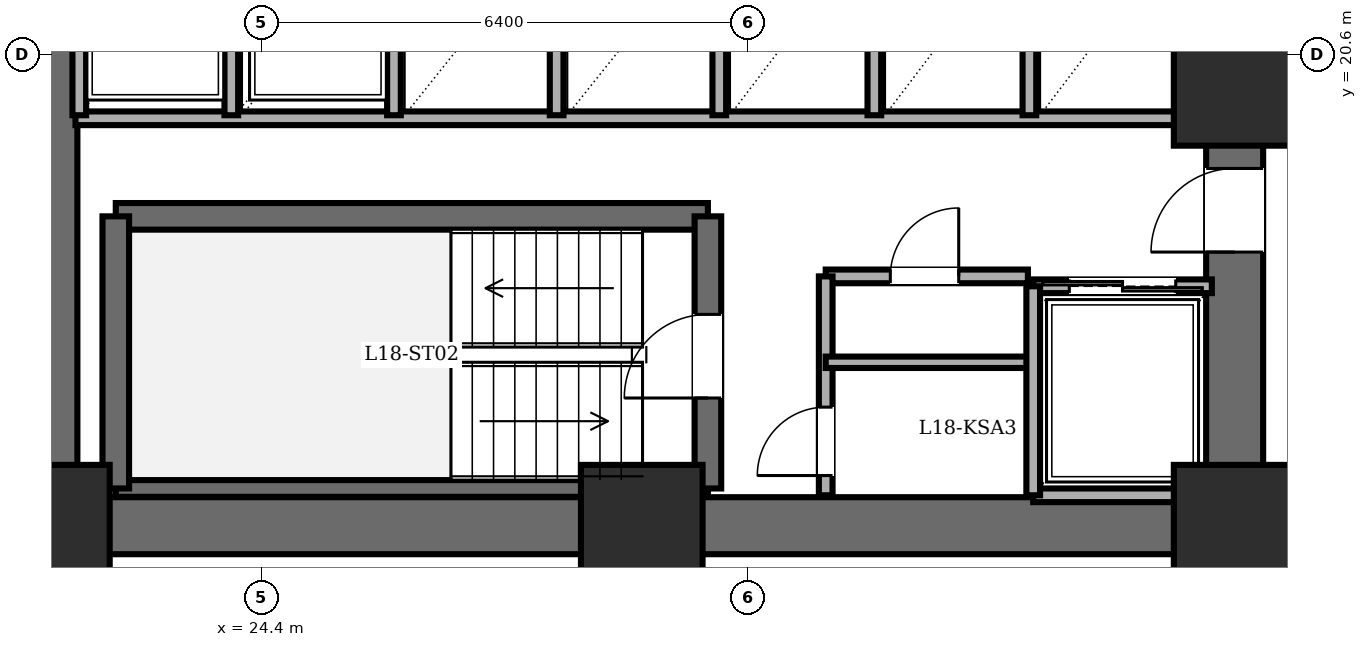
"""IFC4 building model, lengths in metres.
Left out: names, types, materials, properties, quantities, classifications, styles, units other than length and angle.
Written with IfcOpenShell. Run it as: python <this file> out.ifc"""

import sys

from ifc_helpers import new_model, si_unit, direction, frame, frame_2d, origin, origin_2d, place, context, subcontext, project, spatial, rectangle, extrude, element, fill, save


model = new_model("IFC4")
c1 = context("Model", 3, precision=1e-05, world=origin(), true_north=direction((0.0, 1.0)))
c2 = subcontext(c1, "Body", "Model", "MODEL_VIEW")
j1 = project(units=[si_unit("LENGTHUNIT", "METRE"), si_unit("PLANEANGLEUNIT", "RADIAN")], contexts=[c1])
p1 = place(None, origin())
s1 = spatial("IfcSite", under=j1, at=p1, CompositionType="ELEMENT")
p2 = place(p1, origin())
s2 = spatial("IfcBuilding", under=s1, at=p2, CompositionType="ELEMENT")
p3 = place(p2, frame((0.0, 0.0, 68.4)))
s3 = spatial("IfcBuildingStorey", under=s2, at=p3, CompositionType="ELEMENT", Elevation=68.4)
for number, where, z_axis, x_axis in (
    (1, (21.6, 14.4, 0.0), (0.0, 0.0, 1.0), (1.0, 0.0, 0.0)),
    (2, (29.4, 14.4, 0.0), (0.0, 0.0, 1.0), (1.0, 0.0, 0.0)),
    (3, (37.2, 14.4, 0.0), (0.0, 0.0, 1.0), (1.0, 0.0, 0.0)),
    (4, (37.2, 20.2, 0.0), (0.0, 0.0, 1.0), (1.0, 0.0, 0.0)),
):
    element("IfcColumn", number, at=place(p3, frame(where, z_axis=z_axis, x_axis=x_axis)), inside=s3, PredefinedType="COLUMN", context=c2, shape_type="SweptSolid", body=[
        extrude(rectangle(XDim=1.6, YDim=1.6, at=origin_2d()), origin(), (0.0, 0.0, 1.0), 3.6),
    ])
p4 = place(p3, frame((21.6, 14.4, 0.0), z_axis=(0.0, 0.0, 1.0), x_axis=(0.0, 1.0, 0.0)))
e5 = element("IfcWall", 5, at=p4, inside=s3, PredefinedType="SHEAR", context=c2, shape_type="SweptSolid", body=[
    extrude(rectangle(XDim=19.2, YDim=0.75, at=frame_2d((9.6, 0.0))), origin(), (0.0, 0.0, 1.0), 3.4),
])
p5 = place(p3, frame((37.2, 14.4, 0.0), z_axis=(0.0, 0.0, 1.0), x_axis=(-1.0, 0.0, 0.0)))
e6 = element("IfcWall", 6, at=p5, inside=s3, PredefinedType="SHEAR", context=c2, shape_type="SweptSolid", body=[
    extrude(rectangle(XDim=15.6, YDim=0.75, at=frame_2d((7.8, 0.0))), origin(), (0.0, 0.0, 1.0), 3.4),
])
p6 = place(p3, frame((37.2, 14.4, 0.0), z_axis=(0.0, 0.0, 1.0), x_axis=(0.0, 1.0, 0.0)))
e7 = element("IfcWall", 7, at=p6, inside=s3, PredefinedType="SHEAR", context=c2, shape_type="SweptSolid", body=[
    extrude(rectangle(XDim=19.2, YDim=0.75, at=frame_2d((9.6, 0.0))), origin(), (0.0, 0.0, 1.0), 3.4),
])
p7 = place(p6, frame((15.8, 0.0, 0.0)))
e8 = element("IfcOpeningElement", 8, at=p7, cuts=e7, PredefinedType="OPENING", context=c2, shape_type="SweptSolid", body=[
    extrude(rectangle(XDim=1.15, YDim=2.15, at=frame_2d((0.575, 1.075))), frame((0.0, 0.385, 0.0), z_axis=(0.0, -1.0, 0.0), x_axis=(1.0, 0.0, 0.0)), (0.0, 0.0, 1.0), 0.77),
])
p8 = place(p6, frame((3.6, 0.0, 0.0)))
e9 = element("IfcOpeningElement", 9, at=p8, cuts=e7, PredefinedType="OPENING", context=c2, shape_type="SweptSolid", body=[
    extrude(rectangle(XDim=1.1, YDim=2.15, at=frame_2d((0.55, 1.075))), frame((0.0, 0.385, 0.0), z_axis=(0.0, -1.0, 0.0), x_axis=(1.0, 0.0, 0.0)), (0.0, 0.0, 1.0), 0.77),
])
p9 = place(p6, frame((8.6, 0.0, 0.0)))
e10 = element("IfcOpeningElement", 10, at=p9, cuts=e7, PredefinedType="OPENING", context=c2, shape_type="SweptSolid", body=[
    extrude(rectangle(XDim=1.3, YDim=2.2, at=frame_2d((0.65, 1.1))), frame((0.0, 0.385, 0.0), z_axis=(0.0, -1.0, 0.0), x_axis=(1.0, 0.0, 0.0)), (0.0, 0.0, 1.0), 0.77),
])
p10 = place(p3, frame((22.48, 18.47, 0.0), z_axis=(0.0, 0.0, 1.0), x_axis=(1.0, 0.0, 0.0)))
e11 = element("IfcWall", 11, at=p10, inside=s3, PredefinedType="SOLIDWALL", context=c2, shape_type="SweptSolid", body=[
    extrude(rectangle(XDim=7.79, YDim=0.35, at=frame_2d((3.895, 0.0))), origin(), (0.0, 0.0, 1.0), 3.4),
])
p11 = place(p3, frame((22.48, 14.89, 0.0), z_axis=(0.0, 0.0, 1.0), x_axis=(1.0, 0.0, 0.0)))
e12 = element("IfcWall", 12, at=p11, inside=s3, PredefinedType="PARTITIONING", context=c2, shape_type="SweptSolid", body=[
    extrude(rectangle(XDim=7.79, YDim=0.22, at=frame_2d((3.895, 0.0))), origin(), (0.0, 0.0, 1.0), 3.4),
])
p12 = place(p3, frame((22.48, 14.89, 0.0), z_axis=(0.0, 0.0, 1.0), x_axis=(0.0, 1.0, 0.0)))
e13 = element("IfcWall", 13, at=p12, inside=s3, PredefinedType="SOLIDWALL", context=c2, shape_type="SweptSolid", body=[
    extrude(rectangle(XDim=3.58, YDim=0.35, at=frame_2d((1.79, 0.0))), origin(), (0.0, 0.0, 1.0), 3.4),
])
p13 = place(p3, frame((30.27, 14.89, 0.0), z_axis=(0.0, 0.0, 1.0), x_axis=(0.0, 1.0, 0.0)))
e14 = element("IfcWall", 14, at=p13, inside=s3, PredefinedType="SOLIDWALL", context=c2, shape_type="SweptSolid", body=[
    extrude(rectangle(XDim=3.58, YDim=0.35, at=frame_2d((1.79, 0.0))), origin(), (0.0, 0.0, 1.0), 3.4),
])
p14 = place(p13, frame((1.19, 0.0, 0.0)))
e15 = element("IfcOpeningElement", 15, at=p14, cuts=e14, PredefinedType="OPENING", context=c2, shape_type="SweptSolid", body=[
    extrude(rectangle(XDim=1.1, YDim=2.15, at=frame_2d((0.55, 1.075))), frame((0.0, 0.185, 0.0), z_axis=(0.0, -1.0, 0.0), x_axis=(1.0, 0.0, 0.0)), (0.0, 0.0, 1.0), 0.37),
])
p15 = place(p3, frame((21.95, 19.76, 0.0), z_axis=(0.0, 0.0, 1.0), x_axis=(1.0, 0.0, 0.0)))
e16 = element("IfcWall", 16, at=p15, inside=s3, PredefinedType="PARTITIONING", context=c2, shape_type="SweptSolid", body=[
    extrude(rectangle(XDim=14.87, YDim=0.18, at=frame_2d((7.435, 0.0))), origin(), (0.0, 0.0, 1.0), 3.4),
])
p16 = place(p3, frame((31.82, 17.68, 0.0), z_axis=(0.0, 0.0, 1.0), x_axis=(1.0, 0.0, 0.0)))
e17 = element("IfcWall", 17, at=p16, inside=s3, PredefinedType="PARTITIONING", context=c2, shape_type="SweptSolid", body=[
    extrude(rectangle(XDim=2.66, YDim=0.18, at=frame_2d((1.33, 0.0))), origin(), (0.0, 0.0, 1.0), 3.4),
])
p17 = place(p16, frame((0.85, 0.0, 0.0)))
e18 = element("IfcOpeningElement", 18, at=p17, cuts=e17, PredefinedType="OPENING", context=c2, shape_type="SweptSolid", body=[
    extrude(rectangle(XDim=0.9, YDim=2.05, at=frame_2d((0.45, 1.025))), frame((0.0, 0.1, 0.0), z_axis=(0.0, -1.0, 0.0), x_axis=(1.0, 0.0, 0.0)), (0.0, 0.0, 1.0), 0.2),
])
p18 = place(p3, frame((31.82, 14.8, 0.0), z_axis=(0.0, 0.0, 1.0), x_axis=(0.0, 1.0, 0.0)))
e19 = element("IfcWall", 19, at=p18, inside=s3, PredefinedType="PARTITIONING", context=c2, shape_type="SweptSolid", body=[
    extrude(rectangle(XDim=2.88, YDim=0.18, at=frame_2d((1.44, 0.0))), origin(), (0.0, 0.0, 1.0), 3.4),
])
p19 = place(p18, frame((0.26, 0.0, 0.0)))
e20 = element("IfcOpeningElement", 20, at=p19, cuts=e19, PredefinedType="OPENING", context=c2, shape_type="SweptSolid", body=[
    extrude(rectangle(XDim=0.9, YDim=2.05, at=frame_2d((0.45, 1.025))), frame((0.0, 0.1, 0.0), z_axis=(0.0, -1.0, 0.0), x_axis=(1.0, 0.0, 0.0)), (0.0, 0.0, 1.0), 0.2),
])
p20 = place(p3, frame((31.82, 16.55, 0.0), z_axis=(0.0, 0.0, 1.0), x_axis=(1.0, 0.0, 0.0)))
e21 = element("IfcWall", 21, at=p20, inside=s3, PredefinedType="PARTITIONING", context=c2, shape_type="SweptSolid", body=[
    extrude(rectangle(XDim=2.66, YDim=0.15, at=frame_2d((1.33, 0.0))), origin(), (0.0, 0.0, 1.0), 3.4),
])
p21 = place(p3, frame((34.55, 17.55, 0.0), z_axis=(0.0, 0.0, 1.0), x_axis=(1.0, 0.0, 0.0)))
e22 = element("IfcWall", 22, at=p21, inside=s3, PredefinedType="PARTITIONING", context=c2, shape_type="SweptSolid", body=[
    extrude(rectangle(XDim=2.35, YDim=0.18, at=frame_2d((1.175, 0.0))), origin(), (0.0, 0.0, 1.0), 3.4),
])
p22 = place(p21, frame((0.475, 0.0, 0.0)))
e23 = element("IfcOpeningElement", 23, at=p22, cuts=e22, PredefinedType="OPENING", context=c2, shape_type="SweptSolid", body=[
    extrude(rectangle(XDim=1.4, YDim=2.3, at=frame_2d((0.7, 1.15))), frame((0.0, 0.1, 0.0), z_axis=(0.0, -1.0, 0.0), x_axis=(1.0, 0.0, 0.0)), (0.0, 0.0, 1.0), 0.2),
])
p23 = place(p3, frame((36.9, 14.8, 0.0), z_axis=(0.0, 0.0, 1.0), x_axis=(-1.0, 0.0, 0.0)))
e24 = element("IfcWall", 24, at=p23, inside=s3, PredefinedType="PARTITIONING", context=c2, shape_type="SweptSolid", body=[
    extrude(rectangle(XDim=2.35, YDim=0.18, at=frame_2d((1.175, 0.0))), origin(), (0.0, 0.0, 1.0), 3.4),
])
p24 = place(p3, frame((34.55, 17.55, 0.0), z_axis=(0.0, 0.0, 1.0), x_axis=(0.0, -1.0, 0.0)))
e25 = element("IfcWall", 25, at=p24, inside=s3, PredefinedType="PARTITIONING", context=c2, shape_type="SweptSolid", body=[
    extrude(rectangle(XDim=2.75, YDim=0.18, at=frame_2d((1.375, 0.0))), origin(), (0.0, 0.0, 1.0), 3.4),
])
for number, where, z_axis, x_axis in (
    (26, (24.0, 19.8, 0.0), (0.0, 0.0, 1.0), (0.0, 1.0, 0.0)),
    (27, (22.0, 22.3, 0.0), (0.0, 0.0, 1.0), (0.0, -1.0, 0.0)),
    (28, (26.14, 19.8, 0.0), (0.0, 0.0, 1.0), (0.0, 1.0, 0.0)),
    (29, (28.28, 19.8, 0.0), (0.0, 0.0, 1.0), (0.0, 1.0, 0.0)),
    (30, (30.42, 19.8, 0.0), (0.0, 0.0, 1.0), (0.0, 1.0, 0.0)),
    (31, (32.46, 19.8, 0.0), (0.0, 0.0, 1.0), (0.0, 1.0, 0.0)),
    (32, (34.5, 19.8, 0.0), (0.0, 0.0, 1.0), (0.0, 1.0, 0.0)),
    (33, (36.54, 19.8, 0.0), (0.0, 0.0, 1.0), (0.0, 1.0, 0.0)),
):
    element("IfcWall", number, at=place(p3, frame(where, z_axis=z_axis, x_axis=x_axis)), inside=s3, PredefinedType="PARTITIONING", context=c2, shape_type="SweptSolid", body=[
        extrude(rectangle(XDim=2.5, YDim=0.18, at=frame_2d((1.25, 0.0))), origin(), (0.0, 0.0, 1.0), 3.4),
    ])
p25 = place(p14, origin())
e34 = element("IfcDoor", 34, at=p25, inside=s3, OperationType="SINGLE_SWING_LEFT", PredefinedType="DOOR", context=c2, shape_type="SweptSolid", body=[
    extrude(rectangle(XDim=1.1, YDim=2.15, at=frame_2d((0.55, 1.075))), frame((0.0, 0.025, 0.0), z_axis=(0.0, -1.0, 0.0), x_axis=(1.0, 0.0, 0.0)), (0.0, 0.0, 1.0), 0.05),
])
fill(e15, e34)
p26 = place(p8, origin())
e35 = element("IfcDoor", 35, at=p26, inside=s3, OperationType="SINGLE_SWING_LEFT", PredefinedType="DOOR", context=c2, shape_type="SweptSolid", body=[
    extrude(rectangle(XDim=1.1, YDim=2.15, at=frame_2d((0.55, 1.075))), frame((0.0, 0.025, 0.0), z_axis=(0.0, -1.0, 0.0), x_axis=(1.0, 0.0, 0.0)), (0.0, 0.0, 1.0), 0.05),
])
fill(e9, e35)
p27 = place(p17, origin())
e36 = element("IfcDoor", 36, at=p27, inside=s3, OperationType="SINGLE_SWING_RIGHT", PredefinedType="DOOR", context=c2, shape_type="SweptSolid", body=[
    extrude(rectangle(XDim=0.9, YDim=2.05, at=frame_2d((0.45, 1.025))), frame((0.0, 0.025, 0.0), z_axis=(0.0, -1.0, 0.0), x_axis=(1.0, 0.0, 0.0)), (0.0, 0.0, 1.0), 0.05),
])
fill(e18, e36)
p28 = place(p19, origin())
e37 = element("IfcDoor", 37, at=p28, inside=s3, OperationType="SINGLE_SWING_LEFT", PredefinedType="DOOR", context=c2, shape_type="SweptSolid", body=[
    extrude(rectangle(XDim=0.9, YDim=2.05, at=frame_2d((0.45, 1.025))), frame((0.0, 0.025, 0.0), z_axis=(0.0, -1.0, 0.0), x_axis=(1.0, 0.0, 0.0)), (0.0, 0.0, 1.0), 0.05),
])
fill(e20, e37)
p29 = place(p22, origin())
e38 = element("IfcDoor", 38, at=p29, inside=s3, OperationType="DOUBLE_DOOR_SLIDING", PredefinedType="DOOR", context=c2, shape_type="SweptSolid", body=[
    extrude(rectangle(XDim=1.4, YDim=2.3, at=frame_2d((0.7, 1.15))), frame((0.0, 0.025, 0.0), z_axis=(0.0, -1.0, 0.0), x_axis=(1.0, 0.0, 0.0)), (0.0, 0.0, 1.0), 0.05),
])
fill(e23, e38)
save(model, sys.argv[1])
